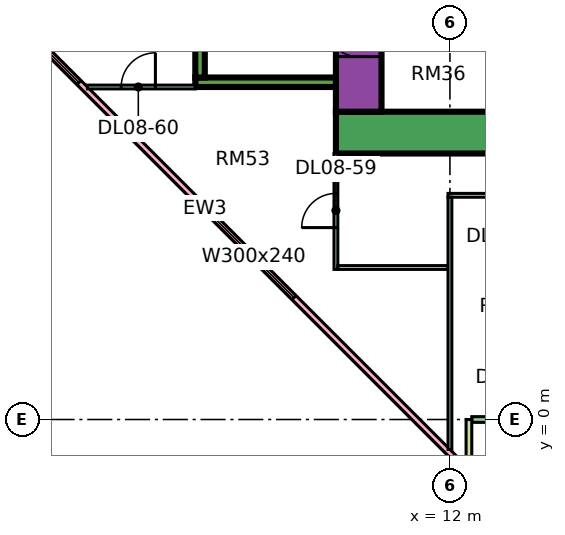
"""IFC4 building model, lengths in metres.
Left out: names, types, materials, properties, quantities, classifications, styles, units other than length and angle.
Written with IfcOpenShell. Run it as: python <this file> out.ifc"""

import sys

from ifc_helpers import new_model, si_unit, direction, frame, frame_2d, origin, place, context, subcontext, project, spatial, rectangle, extrude, element, fill, save


model = new_model("IFC4")
c1 = context("Model", 3, precision=1e-05, world=origin(), true_north=direction((0.0, 1.0)))
c2 = subcontext(c1, "Body", "Model", "MODEL_VIEW")
j1 = project(units=[si_unit("LENGTHUNIT", "METRE"), si_unit("PLANEANGLEUNIT", "RADIAN")], contexts=[c1])
p1 = place(None, origin())
s1 = spatial("IfcSite", under=j1, at=p1, CompositionType="ELEMENT")
p2 = place(p1, origin())
s2 = spatial("IfcBuilding", under=s1, at=p2, CompositionType="ELEMENT")
p3 = place(p2, frame((0.0, 0.0, 45.15)))
s3 = spatial("IfcBuildingStorey", under=s2, at=p3, CompositionType="ELEMENT", Elevation=45.15)
p4 = place(p3, frame((9.0, 7.55, 0.0), z_axis=(0.0, 0.0, 1.0), x_axis=(1.0, 0.0, 0.0)))
e1 = element("IfcWall", 1, at=p4, inside=s3, PredefinedType="SHEAR", context=c2, shape_type="SweptSolid", body=[
    extrude(rectangle(XDim=25.0, YDim=1.1, at=frame_2d((12.5, 0.0))), origin(), (0.0, 0.0, 1.0), 3.75),
])
p5 = place(p3, frame((9.6, 8.1, 0.0), z_axis=(0.0, 0.0, 1.0), x_axis=(0.0, 1.0, 0.0)))
e2 = element("IfcWall", 2, at=p5, inside=s3, PredefinedType="SHEAR", context=c2, shape_type="SweptSolid", body=[
    extrude(rectangle(XDim=10.8, YDim=1.2, at=frame_2d((5.4, 0.0))), origin(), (0.0, 0.0, 1.0), 3.75),
])
p6 = place(p5, frame((3.775, 0.0, 0.0)))
e3 = element("IfcOpeningElement", 3, at=p6, cuts=e2, PredefinedType="OPENING", context=c2, shape_type="SweptSolid", body=[
    extrude(rectangle(XDim=1.1, YDim=2.2, at=frame_2d((0.55, 1.1))), frame((0.0, 0.61, 0.0), z_axis=(0.0, -1.0, 0.0), x_axis=(1.0, 0.0, 0.0)), (0.0, 0.0, 1.0), 1.22),
])
p7 = place(p5, frame((6.275, 0.0, 0.0)))
e4 = element("IfcOpeningElement", 4, at=p7, cuts=e2, PredefinedType="OPENING", context=c2, shape_type="SweptSolid", body=[
    extrude(rectangle(XDim=1.1, YDim=2.2, at=frame_2d((0.55, 1.1))), frame((0.0, 0.61, 0.0), z_axis=(0.0, -1.0, 0.0), x_axis=(1.0, 0.0, 0.0)), (0.0, 0.0, 1.0), 1.22),
])
p8 = place(p5, frame((8.95, 0.0, 0.0)))
e5 = element("IfcOpeningElement", 5, at=p8, cuts=e2, PredefinedType="OPENING", context=c2, shape_type="SweptSolid", body=[
    extrude(rectangle(XDim=1.1, YDim=2.2, at=frame_2d((0.55, 1.1))), frame((0.0, 0.61, 0.0), z_axis=(0.0, -1.0, 0.0), x_axis=(1.0, 0.0, 0.0)), (0.0, 0.0, 1.0), 1.22),
])
p9 = place(p5, frame((1.45, 0.0, 0.0)))
e6 = element("IfcOpeningElement", 6, at=p9, cuts=e2, PredefinedType="OPENING", context=c2, shape_type="SweptSolid", body=[
    extrude(rectangle(XDim=0.9, YDim=2.1, at=frame_2d((0.45, 1.05))), frame((0.0, 0.61, 0.0), z_axis=(0.0, -1.0, 0.0), x_axis=(1.0, 0.0, 0.0)), (0.0, 0.0, 1.0), 1.22),
])
p10 = place(p3, frame((5.3, 8.875, 0.0), z_axis=(0.0, 0.0, 1.0), x_axis=(1.0, 0.0, 0.0)))
e7 = element("IfcWall", 7, at=p10, inside=s3, PredefinedType="SHEAR", context=c2, shape_type="SweptSolid", body=[
    extrude(rectangle(XDim=3.7, YDim=0.25, at=frame_2d((1.85, 0.0))), origin(), (0.0, 0.0, 1.0), 3.75),
])
p11 = place(p3, frame((5.425, 9.0, 0.0), z_axis=(0.0, 0.0, 1.0), x_axis=(0.0, 1.0, 0.0)))
e8 = element("IfcWall", 8, at=p11, inside=s3, PredefinedType="SHEAR", context=c2, shape_type="SweptSolid", body=[
    extrude(rectangle(XDim=4.0, YDim=0.25, at=frame_2d((2.0, 0.0))), origin(), (0.0, 0.0, 1.0), 3.75),
])
p12 = place(p3, frame((-1.447, 12.553, 0.0), z_axis=(0.0, 0.0, 1.0), x_axis=(0.707106781187, -0.707106781187, 0.0)))
e9 = element("IfcWall", 9, at=p12, inside=s3, PredefinedType="SOLIDWALL", context=c2, shape_type="SweptSolid", body=[
    extrude(rectangle(XDim=19.799, YDim=0.15, at=frame_2d((9.899, 0.0))), origin(), (0.0, 0.0, 1.0), 3.35),
])
p13 = place(p12, frame((2.212, 0.0, 0.45)))
e10 = element("IfcOpeningElement", 10, at=p13, cuts=e9, PredefinedType="OPENING", context=c2, shape_type="SweptSolid", body=[
    extrude(rectangle(XDim=3.0, YDim=2.4, at=frame_2d((1.5, 1.2))), frame((0.0, 0.085, 0.0), z_axis=(0.0, -1.0, 0.0), x_axis=(1.0, 0.0, 0.0)), (0.0, 0.0, 1.0), 0.17),
])
p14 = place(p12, frame((10.216, 0.0, 0.45)))
e11 = element("IfcOpeningElement", 11, at=p14, cuts=e9, PredefinedType="OPENING", context=c2, shape_type="SweptSolid", body=[
    extrude(rectangle(XDim=3.0, YDim=2.4, at=frame_2d((1.5, 1.2))), frame((0.0, 0.085, 0.0), z_axis=(0.0, -1.0, 0.0), x_axis=(1.0, 0.0, 0.0)), (0.0, 0.0, 1.0), 0.17),
])
p15 = place(p3, frame((12.575, 0.0, 0.0), z_axis=(0.0, 0.0, 1.0), x_axis=(1.0, 0.0, 0.0)))
e12 = element("IfcWall", 12, at=p15, inside=s3, PredefinedType="SOLIDWALL", context=c2, shape_type="SweptSolid", body=[
    extrude(rectangle(XDim=11.35, YDim=0.15, at=frame_2d((5.675, 0.0))), origin(), (0.0, 0.0, 1.0), 3.35),
])
p16 = place(p15, frame((0.613, 0.0, 0.0)))
e13 = element("IfcOpeningElement", 13, at=p16, cuts=e12, PredefinedType="OPENING", context=c2, shape_type="SweptSolid", body=[
    extrude(rectangle(XDim=1.2, YDim=2.4, at=frame_2d((0.6, 1.2))), frame((0.0, 0.085, 0.0), z_axis=(0.0, -1.0, 0.0), x_axis=(1.0, 0.0, 0.0)), (0.0, 0.0, 1.0), 0.17),
])
p17 = place(p15, frame((3.025, 0.0, 0.45)))
e14 = element("IfcOpeningElement", 14, at=p17, cuts=e12, PredefinedType="OPENING", context=c2, shape_type="SweptSolid", body=[
    extrude(rectangle(XDim=1.8, YDim=2.4, at=frame_2d((0.9, 1.2))), frame((0.0, 0.085, 0.0), z_axis=(0.0, -1.0, 0.0), x_axis=(1.0, 0.0, 0.0)), (0.0, 0.0, 1.0), 0.17),
])
p18 = place(p15, frame((6.6, 0.0, 0.45)))
e15 = element("IfcOpeningElement", 15, at=p18, cuts=e12, PredefinedType="OPENING", context=c2, shape_type="SweptSolid", body=[
    extrude(rectangle(XDim=3.0, YDim=2.4, at=frame_2d((1.5, 1.2))), frame((0.0, 0.085, 0.0), z_axis=(0.0, -1.0, 0.0), x_axis=(1.0, 0.0, 0.0)), (0.0, 0.0, 1.0), 0.17),
])
p19 = place(p3, frame((12.5, -1.5, 0.0), z_axis=(0.0, 0.0, 1.0), x_axis=(0.0, 1.0, 0.0)))
e16 = element("IfcWall", 16, at=p19, inside=s3, PredefinedType="SOLIDWALL", context=c2, shape_type="SweptSolid", body=[
    extrude(rectangle(XDim=1.5, YDim=0.15, at=frame_2d((0.75, 0.0))), origin(), (0.0, 0.0, 1.0), 3.35),
])
p20 = place(p3, frame((2.461, 8.75, 0.0), z_axis=(0.0, 0.0, 1.0), x_axis=(1.0, 0.0, 0.0)))
e17 = element("IfcWall", 17, at=p20, inside=s3, PredefinedType="PARTITIONING", context=c2, shape_type="SweptSolid", body=[
    extrude(rectangle(XDim=2.839, YDim=0.1, at=frame_2d((1.419, 0.0))), origin(), (0.0, 0.0, 1.0), 3.35),
])
p21 = place(p20, frame((0.889, 0.0, 0.0)))
e18 = element("IfcOpeningElement", 18, at=p21, cuts=e17, PredefinedType="OPENING", context=c2, shape_type="SweptSolid", body=[
    extrude(rectangle(XDim=0.9, YDim=2.1, at=frame_2d((0.45, 1.05))), frame((0.0, 0.06, 0.0), z_axis=(0.0, -1.0, 0.0), x_axis=(1.0, 0.0, 0.0)), (0.0, 0.0, 1.0), 0.12),
])
p22 = place(p3, frame((9.0, 3.95, 0.0), z_axis=(0.0, 0.0, 1.0), x_axis=(0.0, 1.0, 0.0)))
e19 = element("IfcWall", 19, at=p22, inside=s3, PredefinedType="PARTITIONING", context=c2, shape_type="SweptSolid", body=[
    extrude(rectangle(XDim=3.05, YDim=0.1, at=frame_2d((1.525, 0.0))), origin(), (0.0, 0.0, 1.0), 3.35),
])
p23 = place(p22, frame((1.1, 0.0, 0.0)))
e20 = element("IfcOpeningElement", 20, at=p23, cuts=e19, PredefinedType="OPENING", context=c2, shape_type="SweptSolid", body=[
    extrude(rectangle(XDim=0.9, YDim=2.1, at=frame_2d((0.45, 1.05))), frame((0.0, 0.06, 0.0), z_axis=(0.0, -1.0, 0.0), x_axis=(1.0, 0.0, 0.0)), (0.0, 0.0, 1.0), 0.12),
])
p24 = place(p3, frame((9.05, 4.0, 0.0), z_axis=(0.0, 0.0, 1.0), x_axis=(1.0, 0.0, 0.0)))
e21 = element("IfcWall", 21, at=p24, inside=s3, PredefinedType="PARTITIONING", context=c2, shape_type="SweptSolid", body=[
    extrude(rectangle(XDim=2.9, YDim=0.1, at=frame_2d((1.45, 0.0))), origin(), (0.0, 0.0, 1.0), 3.35),
])
p25 = place(p3, frame((11.95, 5.9, 0.0), z_axis=(0.0, 0.0, 1.0), x_axis=(1.0, 0.0, 0.0)))
e22 = element("IfcWall", 22, at=p25, inside=s3, PredefinedType="PARTITIONING", context=c2, shape_type="SweptSolid", body=[
    extrude(rectangle(XDim=21.1, YDim=0.1, at=frame_2d((10.55, 0.0))), origin(), (0.0, 0.0, 1.0), 3.35),
])
p26 = place(p25, frame((1.1, 0.0, 0.0)))
e23 = element("IfcOpeningElement", 23, at=p26, cuts=e22, PredefinedType="OPENING", context=c2, shape_type="SweptSolid", body=[
    extrude(rectangle(XDim=0.9, YDim=2.1, at=frame_2d((0.45, 1.05))), frame((0.0, 0.06, 0.0), z_axis=(0.0, -1.0, 0.0), x_axis=(1.0, 0.0, 0.0)), (0.0, 0.0, 1.0), 0.12),
])
p27 = place(p25, frame((4.1, 0.0, 0.0)))
e24 = element("IfcOpeningElement", 24, at=p27, cuts=e22, PredefinedType="OPENING", context=c2, shape_type="SweptSolid", body=[
    extrude(rectangle(XDim=0.9, YDim=2.1, at=frame_2d((0.45, 1.05))), frame((0.0, 0.06, 0.0), z_axis=(0.0, -1.0, 0.0), x_axis=(1.0, 0.0, 0.0)), (0.0, 0.0, 1.0), 0.12),
])
p28 = place(p25, frame((16.1, 0.0, 0.0)))
e25 = element("IfcOpeningElement", 25, at=p28, cuts=e22, PredefinedType="OPENING", context=c2, shape_type="SweptSolid", body=[
    extrude(rectangle(XDim=0.9, YDim=2.1, at=frame_2d((0.45, 1.05))), frame((0.0, 0.06, 0.0), z_axis=(0.0, -1.0, 0.0), x_axis=(1.0, 0.0, 0.0)), (0.0, 0.0, 1.0), 0.12),
])
p29 = place(p25, frame((10.1, 0.0, 0.0)))
e26 = element("IfcOpeningElement", 26, at=p29, cuts=e22, PredefinedType="OPENING", context=c2, shape_type="SweptSolid", body=[
    extrude(rectangle(XDim=0.9, YDim=2.1, at=frame_2d((0.45, 1.05))), frame((0.0, 0.06, 0.0), z_axis=(0.0, -1.0, 0.0), x_axis=(1.0, 0.0, 0.0)), (0.0, 0.0, 1.0), 0.12),
])
p30 = place(p3, frame((12.0, -0.788, 0.0), z_axis=(0.0, 0.0, 1.0), x_axis=(0.0, 1.0, 0.0)))
e27 = element("IfcWall", 27, at=p30, inside=s3, PredefinedType="PARTITIONING", context=c2, shape_type="SweptSolid", body=[
    extrude(rectangle(XDim=6.638, YDim=0.1, at=frame_2d((3.319, 0.0))), origin(), (0.0, 0.0, 1.0), 3.35),
])
p31 = place(p13, origin())
e28 = element("IfcWindow", 28, at=p31, inside=s3, PartitioningType="SINGLE_PANEL", PredefinedType="WINDOW", context=c2, shape_type="SweptSolid", body=[
    extrude(rectangle(XDim=3.0, YDim=2.4, at=frame_2d((1.5, 1.2))), frame((0.0, 0.03, 0.0), z_axis=(0.0, -1.0, 0.0), x_axis=(1.0, 0.0, 0.0)), (0.0, 0.0, 1.0), 0.06),
])
fill(e10, e28)
p32 = place(p14, origin())
e29 = element("IfcWindow", 29, at=p32, inside=s3, PartitioningType="SINGLE_PANEL", PredefinedType="WINDOW", context=c2, shape_type="SweptSolid", body=[
    extrude(rectangle(XDim=3.0, YDim=2.4, at=frame_2d((1.5, 1.2))), frame((0.0, 0.03, 0.0), z_axis=(0.0, -1.0, 0.0), x_axis=(1.0, 0.0, 0.0)), (0.0, 0.0, 1.0), 0.06),
])
fill(e11, e29)
p33 = place(p9, frame((0.9, 0.0, 0.0), z_axis=(0.0, 0.0, 1.0), x_axis=(-1.0, 0.0, 0.0)))
e30 = element("IfcDoor", 30, at=p33, inside=s3, OperationType="SINGLE_SWING_RIGHT", PredefinedType="DOOR", context=c2, shape_type="SweptSolid", body=[
    extrude(rectangle(XDim=0.9, YDim=2.1, at=frame_2d((0.45, 1.05))), frame((0.0, 0.025, 0.0), z_axis=(0.0, -1.0, 0.0), x_axis=(1.0, 0.0, 0.0)), (0.0, 0.0, 1.0), 0.05),
])
fill(e6, e30)
p34 = place(p23, origin())
e31 = element("IfcDoor", 31, at=p34, inside=s3, OperationType="SINGLE_SWING_LEFT", PredefinedType="DOOR", context=c2, shape_type="SweptSolid", body=[
    extrude(rectangle(XDim=0.9, YDim=2.1, at=frame_2d((0.45, 1.05))), frame((0.0, 0.025, 0.0), z_axis=(0.0, -1.0, 0.0), x_axis=(1.0, 0.0, 0.0)), (0.0, 0.0, 1.0), 0.05),
])
fill(e20, e31)
p35 = place(p21, frame((0.9, 0.0, 0.0), z_axis=(0.0, 0.0, 1.0), x_axis=(-1.0, 0.0, 0.0)))
e32 = element("IfcDoor", 32, at=p35, inside=s3, OperationType="SINGLE_SWING_RIGHT", PredefinedType="DOOR", context=c2, shape_type="SweptSolid", body=[
    extrude(rectangle(XDim=0.9, YDim=2.1, at=frame_2d((0.45, 1.05))), frame((0.0, 0.025, 0.0), z_axis=(0.0, -1.0, 0.0), x_axis=(1.0, 0.0, 0.0)), (0.0, 0.0, 1.0), 0.05),
])
fill(e18, e32)
save(model, sys.argv[1])
